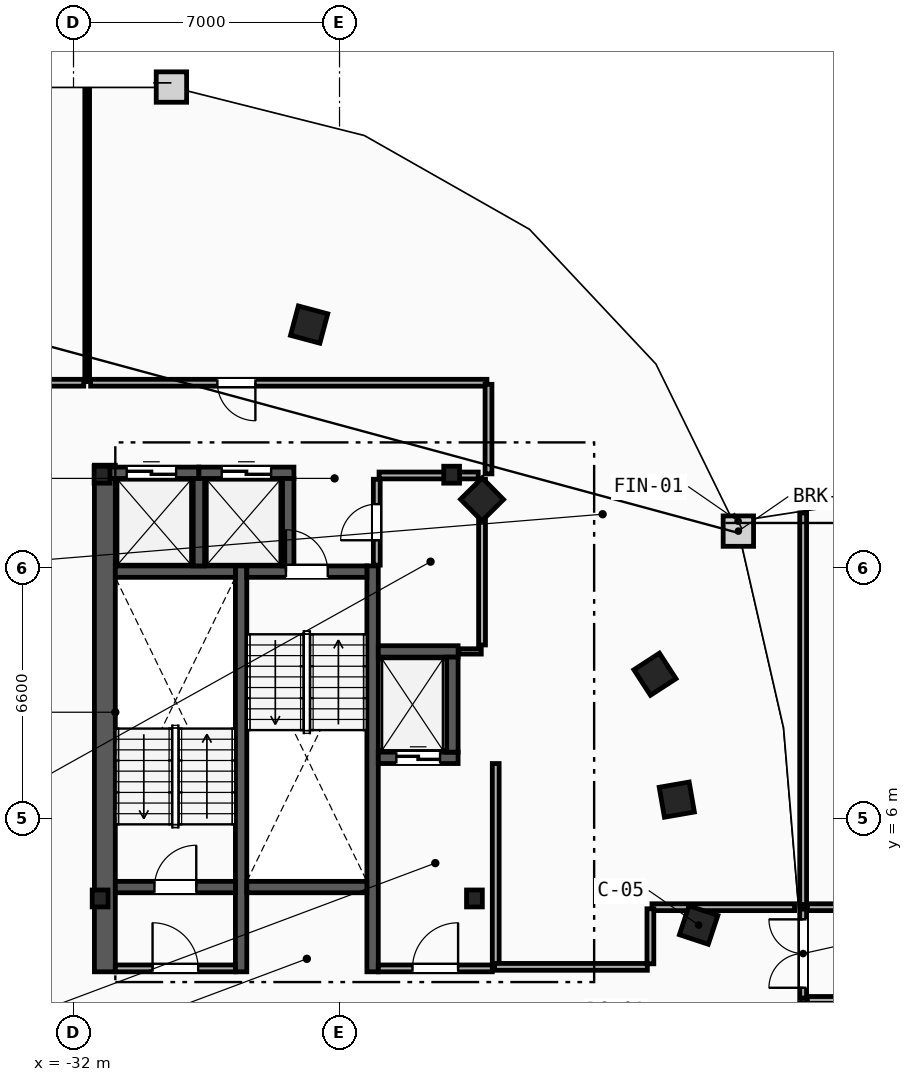
"""IFC4 building model, lengths in metres.
Left out: names, types, materials, properties, quantities, classifications, styles, units other than length and angle.
Written with IfcOpenShell. Run it as: python <this file> out.ifc"""

import sys

from ifc_helpers import new_model, si_unit, direction, frame, frame_2d, origin, origin_2d, place, context, subcontext, project, spatial, rectangle, i_section, extrude, element, fill, save


model = new_model("IFC4")
c1 = context("Model", 3, precision=1e-05, world=origin(), true_north=direction((0.0, 1.0)))
c2 = subcontext(c1, "Body", "Model", "MODEL_VIEW")
j1 = project(units=[si_unit("LENGTHUNIT", "METRE"), si_unit("PLANEANGLEUNIT", "RADIAN")], contexts=[c1])
p1 = place(None, origin())
s1 = spatial("IfcSite", under=j1, at=p1, CompositionType="ELEMENT")
p2 = place(p1, origin())
s2 = spatial("IfcBuilding", under=s1, at=p2, CompositionType="ELEMENT")
p3 = place(p2, frame((0.0, 0.0, 268.4)))
s3 = spatial("IfcBuildingStorey", under=s2, at=p3, CompositionType="ELEMENT", Elevation=268.4)
for number, where, z_axis, x_axis in (
    (1, (-31.3, 3.9, 0.0), (0.0, 0.0, 1.0), (1.0, 0.0, 0.0)),
    (2, (-21.45, 3.9, 0.0), (0.0, 0.0, 1.0), (1.0, 0.0, 0.0)),
    (3, (-22.05, 15.05, 0.0), (0.0, 0.0, 1.0), (1.0, 0.0, 0.0)),
    (4, (-31.25, 15.05, 0.0), (0.0, 0.0, 1.0), (1.0, 0.0, 0.0)),
):
    element("IfcColumn", number, at=place(p3, frame(where, z_axis=z_axis, x_axis=x_axis)), inside=s3, PredefinedType="COLUMN", context=c2, shape_type="SweptSolid", body=[
        extrude(i_section(OverallWidth=0.416, OverallDepth=0.446, WebThickness=0.039, FlangeThickness=0.063, FilletRadius=0.018, at=origin_2d()), origin(), (0.0, 0.0, 1.0), 3.6),
    ])
for number, where, z_axis, x_axis in (
    (5, (-15.55, 3.2, 0.0), (0.0, 0.0, 1.0), (0.315, 0.949, 0.0)),
    (6, (-16.125, 6.5, 0.0), (0.0, 0.0, 1.0), (-0.172, 0.985, 0.0)),
    (7, (-16.7, 9.8, 0.0), (0.0, 0.0, 1.0), (-0.544, 0.839, 0.0)),
    (8, (-21.25, 14.4, 0.0), (0.0, 0.0, 1.0), (-0.703, 0.711, 0.0)),
    (9, (-25.8, 19.0, 0.0), (0.0, 0.0, 1.0), (-0.966, 0.259, 0.0)),
):
    element("IfcColumn", number, at=place(p3, frame(where, z_axis=z_axis, x_axis=x_axis)), inside=s3, PredefinedType="COLUMN", context=c2, shape_type="SweptSolid", body=[
        extrude(rectangle(XDim=0.8, YDim=0.8, at=origin_2d()), origin(), (0.0, 0.0, 1.0), 3.6),
    ])
p4 = place(p3, frame((-31.175, 1.97, 0.0), z_axis=(0.0, 0.0, 1.0), x_axis=(0.0, 1.0, 0.0)))
e10 = element("IfcWall", 10, at=p4, inside=s3, PredefinedType="SHEAR", context=c2, shape_type="SweptSolid", body=[
    extrude(rectangle(XDim=13.33, YDim=0.55, at=frame_2d((6.665, 0.0))), origin(), (0.0, 0.0, 1.0), 3.34),
])
for number, where, z_axis, x_axis in (
    (11, (-27.59, 1.97, 0.0), (0.0, 0.0, 1.0), (0.0, 1.0, 0.0)),
    (12, (-24.13, 1.97, 0.0), (0.0, 0.0, 1.0), (0.0, 1.0, 0.0)),
):
    element("IfcWall", number, at=place(p3, frame(where, z_axis=z_axis, x_axis=x_axis)), inside=s3, PredefinedType="SHEAR", context=c2, shape_type="SweptSolid", body=[
        extrude(rectangle(XDim=10.68, YDim=0.3, at=frame_2d((5.34, 0.0))), origin(), (0.0, 0.0, 1.0), 3.34),
    ])
p5 = place(p3, frame((-30.9, 4.2, 0.0), z_axis=(0.0, 0.0, 1.0), x_axis=(1.0, 0.0, 0.0)))
e13 = element("IfcWall", 13, at=p5, inside=s3, PredefinedType="SHEAR", context=c2, shape_type="SweptSolid", body=[
    extrude(rectangle(XDim=3.16, YDim=0.3, at=frame_2d((1.58, 0.0))), origin(), (0.0, 0.0, 1.0), 3.34),
])
p6 = place(p5, frame((1.03, 0.0, 0.0)))
e14 = element("IfcOpeningElement", 14, at=p6, cuts=e13, PredefinedType="OPENING", context=c2, shape_type="SweptSolid", body=[
    extrude(rectangle(XDim=1.1, YDim=2.15, at=frame_2d((0.55, 1.075))), frame((0.0, 0.16, 0.0), z_axis=(0.0, -1.0, 0.0), x_axis=(1.0, 0.0, 0.0)), (0.0, 0.0, 1.0), 0.32),
])
p7 = place(p3, frame((-30.9, 12.5, 0.0), z_axis=(0.0, 0.0, 1.0), x_axis=(1.0, 0.0, 0.0)))
e15 = element("IfcWall", 15, at=p7, inside=s3, PredefinedType="SHEAR", context=c2, shape_type="SweptSolid", body=[
    extrude(rectangle(XDim=3.16, YDim=0.3, at=frame_2d((1.58, 0.0))), origin(), (0.0, 0.0, 1.0), 3.34),
])
p8 = place(p3, frame((-27.44, 12.5, 0.0), z_axis=(0.0, 0.0, 1.0), x_axis=(1.0, 0.0, 0.0)))
e16 = element("IfcWall", 16, at=p8, inside=s3, PredefinedType="SHEAR", context=c2, shape_type="SweptSolid", body=[
    extrude(rectangle(XDim=3.16, YDim=0.3, at=frame_2d((1.58, 0.0))), origin(), (0.0, 0.0, 1.0), 3.34),
])
p9 = place(p8, frame((1.03, 0.0, 0.0)))
e17 = element("IfcOpeningElement", 17, at=p9, cuts=e16, PredefinedType="OPENING", context=c2, shape_type="SweptSolid", body=[
    extrude(rectangle(XDim=1.1, YDim=2.15, at=frame_2d((0.55, 1.075))), frame((0.0, 0.16, 0.0), z_axis=(0.0, -1.0, 0.0), x_axis=(1.0, 0.0, 0.0)), (0.0, 0.0, 1.0), 0.32),
])
p10 = place(p3, frame((-27.44, 4.2, 0.0), z_axis=(0.0, 0.0, 1.0), x_axis=(1.0, 0.0, 0.0)))
e18 = element("IfcWall", 18, at=p10, inside=s3, PredefinedType="SHEAR", context=c2, shape_type="SweptSolid", body=[
    extrude(rectangle(XDim=3.16, YDim=0.3, at=frame_2d((1.58, 0.0))), origin(), (0.0, 0.0, 1.0), 3.34),
])
p11 = place(p3, frame((-20.89, 2.15, 0.0), z_axis=(0.0, 0.0, 1.0), x_axis=(0.0, 1.0, 0.0)))
e19 = element("IfcWall", 19, at=p11, inside=s3, PredefinedType="PARTITIONING", context=c2, shape_type="SweptSolid", body=[
    extrude(rectangle(XDim=5.3, YDim=0.18, at=frame_2d((2.65, 0.0))), origin(), (0.0, 0.0, 1.0), 3.34),
])
p12 = place(p3, frame((-23.98, 2.06, 0.0), z_axis=(0.0, 0.0, 1.0), x_axis=(1.0, 0.0, 0.0)))
e20 = element("IfcWall", 20, at=p12, inside=s3, PredefinedType="PARTITIONING", context=c2, shape_type="SweptSolid", body=[
    extrude(rectangle(XDim=3.0, YDim=0.18, at=frame_2d((1.5, 0.0))), origin(), (0.0, 0.0, 1.0), 3.34),
])
p13 = place(p12, frame((0.9, 0.0, 0.0)))
e21 = element("IfcOpeningElement", 21, at=p13, cuts=e20, PredefinedType="OPENING", context=c2, shape_type="SweptSolid", body=[
    extrude(rectangle(XDim=1.2, YDim=2.15, at=frame_2d((0.6, 1.075))), frame((0.0, 0.1, 0.0), z_axis=(0.0, -1.0, 0.0), x_axis=(1.0, 0.0, 0.0)), (0.0, 0.0, 1.0), 0.2),
])
p14 = place(p3, frame((-30.9, 2.06, 0.0), z_axis=(0.0, 0.0, 1.0), x_axis=(1.0, 0.0, 0.0)))
e22 = element("IfcWall", 22, at=p14, inside=s3, PredefinedType="PARTITIONING", context=c2, shape_type="SweptSolid", body=[
    extrude(rectangle(XDim=3.16, YDim=0.18, at=frame_2d((1.58, 0.0))), origin(), (0.0, 0.0, 1.0), 3.34),
])
p15 = place(p14, frame((0.98, 0.0, 0.0)))
e23 = element("IfcOpeningElement", 23, at=p15, cuts=e22, PredefinedType="OPENING", context=c2, shape_type="SweptSolid", body=[
    extrude(rectangle(XDim=1.2, YDim=2.15, at=frame_2d((0.6, 1.075))), frame((0.0, 0.1, 0.0), z_axis=(0.0, -1.0, 0.0), x_axis=(1.0, 0.0, 0.0)), (0.0, 0.0, 1.0), 0.2),
])
p16 = place(p3, frame((-23.98, 7.6, 0.0), z_axis=(0.0, 0.0, 1.0), x_axis=(1.0, 0.0, 0.0)))
e24 = element("IfcWall", 24, at=p16, inside=s3, PredefinedType="SHEAR", context=c2, shape_type="SweptSolid", body=[
    extrude(rectangle(XDim=2.1, YDim=0.3, at=frame_2d((1.05, 0.0))), origin(), (0.0, 0.0, 1.0), 3.34),
])
p17 = place(p16, frame((0.475, 0.0, 0.0)))
e25 = element("IfcOpeningElement", 25, at=p17, cuts=e24, PredefinedType="OPENING", context=c2, shape_type="SweptSolid", body=[
    extrude(rectangle(XDim=1.15, YDim=2.2, at=frame_2d((0.575, 1.1))), frame((0.0, 0.16, 0.0), z_axis=(0.0, -1.0, 0.0), x_axis=(1.0, 0.0, 0.0)), (0.0, 0.0, 1.0), 0.32),
])
p18 = place(p3, frame((-23.98, 10.4, 0.0), z_axis=(0.0, 0.0, 1.0), x_axis=(1.0, 0.0, 0.0)))
e26 = element("IfcWall", 26, at=p18, inside=s3, PredefinedType="SHEAR", context=c2, shape_type="SweptSolid", body=[
    extrude(rectangle(XDim=2.1, YDim=0.3, at=frame_2d((1.05, 0.0))), origin(), (0.0, 0.0, 1.0), 3.34),
])
p19 = place(p3, frame((-22.03, 7.75, 0.0), z_axis=(0.0, 0.0, 1.0), x_axis=(0.0, 1.0, 0.0)))
e27 = element("IfcWall", 27, at=p19, inside=s3, PredefinedType="SHEAR", context=c2, shape_type="SweptSolid", body=[
    extrude(rectangle(XDim=2.5, YDim=0.3, at=frame_2d((1.25, 0.0))), origin(), (0.0, 0.0, 1.0), 3.34),
])
p20 = place(p3, frame((-31.2, 15.1, 0.0), z_axis=(0.0, 0.0, 1.0), x_axis=(1.0, 0.0, 0.0)))
e28 = element("IfcWall", 28, at=p20, inside=s3, PredefinedType="SHEAR", context=c2, shape_type="SweptSolid", body=[
    extrude(rectangle(XDim=2.5, YDim=0.3, at=frame_2d((1.25, 0.0))), origin(), (0.0, 0.0, 1.0), 3.34),
])
p21 = place(p20, frame((0.6, 0.0, 0.0)))
e29 = element("IfcOpeningElement", 29, at=p21, cuts=e28, PredefinedType="OPENING", context=c2, shape_type="SweptSolid", body=[
    extrude(rectangle(XDim=1.3, YDim=2.2, at=frame_2d((0.65, 1.1))), frame((0.0, 0.16, 0.0), z_axis=(0.0, -1.0, 0.0), x_axis=(1.0, 0.0, 0.0)), (0.0, 0.0, 1.0), 0.32),
])
p22 = place(p3, frame((-28.7, 12.65, 0.0), z_axis=(0.0, 0.0, 1.0), x_axis=(0.0, 1.0, 0.0)))
e30 = element("IfcWall", 30, at=p22, inside=s3, PredefinedType="SHEAR", context=c2, shape_type="SweptSolid", body=[
    extrude(rectangle(XDim=2.3, YDim=0.3, at=frame_2d((1.15, 0.0))), origin(), (0.0, 0.0, 1.0), 3.34),
])
p23 = place(p3, frame((-28.7, 15.1, 0.0), z_axis=(0.0, 0.0, 1.0), x_axis=(1.0, 0.0, 0.0)))
e31 = element("IfcWall", 31, at=p23, inside=s3, PredefinedType="SHEAR", context=c2, shape_type="SweptSolid", body=[
    extrude(rectangle(XDim=2.5, YDim=0.3, at=frame_2d((1.25, 0.0))), origin(), (0.0, 0.0, 1.0), 3.34),
])
p24 = place(p23, frame((0.6, 0.0, 0.0)))
e32 = element("IfcOpeningElement", 32, at=p24, cuts=e31, PredefinedType="OPENING", context=c2, shape_type="SweptSolid", body=[
    extrude(rectangle(XDim=1.3, YDim=2.2, at=frame_2d((0.65, 1.1))), frame((0.0, 0.16, 0.0), z_axis=(0.0, -1.0, 0.0), x_axis=(1.0, 0.0, 0.0)), (0.0, 0.0, 1.0), 0.32),
])
p25 = place(p3, frame((-26.35, 12.65, 0.0), z_axis=(0.0, 0.0, 1.0), x_axis=(0.0, 1.0, 0.0)))
e33 = element("IfcWall", 33, at=p25, inside=s3, PredefinedType="SHEAR", context=c2, shape_type="SweptSolid", body=[
    extrude(rectangle(XDim=2.3, YDim=0.3, at=frame_2d((1.15, 0.0))), origin(), (0.0, 0.0, 1.0), 3.34),
])
p26 = place(p3, frame((-21.86, 10.4, 0.0), z_axis=(0.0, 0.0, 1.0), x_axis=(1.0, 0.0, 0.0)))
e34 = element("IfcWall", 34, at=p26, inside=s3, PredefinedType="PARTITIONING", context=c2, shape_type="SweptSolid", body=[
    extrude(rectangle(XDim=0.59, YDim=0.14, at=frame_2d((0.295, 0.0))), origin(), (0.0, 0.0, 1.0), 3.34),
])
p27 = place(p3, frame((-21.25, 10.57, 0.0), z_axis=(0.0, 0.0, 1.0), x_axis=(0.0, 1.0, 0.0)))
e35 = element("IfcWall", 35, at=p27, inside=s3, PredefinedType="PARTITIONING", context=c2, shape_type="SweptSolid", body=[
    extrude(rectangle(XDim=4.36, YDim=0.18, at=frame_2d((2.18, 0.0))), origin(), (0.0, 0.0, 1.0), 3.34),
])
p28 = place(p3, frame((-23.96, 15.03, 0.0), z_axis=(0.0, 0.0, 1.0), x_axis=(1.0, 0.0, 0.0)))
e36 = element("IfcWall", 36, at=p28, inside=s3, PredefinedType="PARTITIONING", context=c2, shape_type="SweptSolid", body=[
    extrude(rectangle(XDim=2.61, YDim=0.18, at=frame_2d((1.305, 0.0))), origin(), (0.0, 0.0, 1.0), 2.413),
])
p29 = place(p3, frame((-24.02, 12.67, 0.0), z_axis=(0.0, 0.0, 1.0), x_axis=(0.0, 1.0, 0.0)))
e37 = element("IfcWall", 37, at=p29, inside=s3, PredefinedType="PARTITIONING", context=c2, shape_type="SweptSolid", body=[
    extrude(rectangle(XDim=2.26, YDim=0.18, at=frame_2d((1.13, 0.0))), origin(), (0.0, 0.0, 1.0), 3.34),
])
p30 = place(p29, frame((0.655, 0.0, 0.0)))
e38 = element("IfcOpeningElement", 38, at=p30, cuts=e37, PredefinedType="OPENING", context=c2, shape_type="SweptSolid", body=[
    extrude(rectangle(XDim=0.95, YDim=2.1, at=frame_2d((0.475, 1.05))), frame((0.0, 0.1, 0.0), z_axis=(0.0, -1.0, 0.0), x_axis=(1.0, 0.0, 0.0)), (0.0, 0.0, 1.0), 0.2),
])
p31 = place(p3, frame((-31.64, 17.5, 0.0), z_axis=(0.0, 0.0, 1.0), x_axis=(0.0, 1.0, 0.0)))
e39 = element("IfcWall", 39, at=p31, inside=s3, PredefinedType="PARTITIONING", context=c2, shape_type="SweptSolid", body=[
    extrude(rectangle(XDim=7.69, YDim=0.125, at=frame_2d((3.845, 0.0))), origin(), (0.0, 0.0, 1.0), 3.34),
])
p32 = place(p3, frame((-31.73, 17.47, 0.0), z_axis=(0.0, 0.0, 1.0), x_axis=(-1.0, 0.0, 0.0)))
e40 = element("IfcWall", 40, at=p32, inside=s3, PredefinedType="PARTITIONING", context=c2, shape_type="SweptSolid", body=[
    extrude(rectangle(XDim=1.898, YDim=0.18, at=frame_2d((0.949, 0.0))), origin(), (0.0, 0.0, 1.0), 3.34),
])
p33 = place(p3, frame((-21.122, 17.47, 0.0), z_axis=(0.0, 0.0, 1.0), x_axis=(-1.0, 0.0, 0.0)))
e41 = element("IfcWall", 41, at=p33, inside=s3, PredefinedType="PARTITIONING", context=c2, shape_type="SweptSolid", body=[
    extrude(rectangle(XDim=10.428, YDim=0.18, at=frame_2d((5.214, 0.0))), origin(), (0.0, 0.0, 1.0), 3.34),
])
p34 = place(p33, frame((6.093, 0.0, 0.0)))
e42 = element("IfcOpeningElement", 42, at=p34, cuts=e41, PredefinedType="OPENING", context=c2, shape_type="SweptSolid", body=[
    extrude(rectangle(XDim=1.0, YDim=2.15, at=frame_2d((0.5, 1.075))), frame((0.0, 0.1, 0.0), z_axis=(0.0, -1.0, 0.0), x_axis=(1.0, 0.0, 0.0)), (0.0, 0.0, 1.0), 0.2),
])
p35 = place(p3, frame((-16.9, 2.1, 0.0), z_axis=(0.0, 0.0, 1.0), x_axis=(-1.0, 0.0, 0.0)))
e43 = element("IfcWall", 43, at=p35, inside=s3, PredefinedType="PARTITIONING", context=c2, shape_type="SweptSolid", body=[
    extrude(rectangle(XDim=4.02, YDim=0.18, at=frame_2d((2.01, 0.0))), origin(), (0.0, 0.0, 1.0), 3.34),
])
p36 = place(p3, frame((-13.026, 3.67, 0.0), z_axis=(0.0, 0.0, 1.0), x_axis=(-1.0, 0.0, 0.0)))
e44 = element("IfcWall", 44, at=p36, inside=s3, PredefinedType="PARTITIONING", context=c2, shape_type="SweptSolid", body=[
    extrude(rectangle(XDim=3.753, YDim=0.18, at=frame_2d((1.876, 0.0))), origin(), (0.0, 0.0, 1.0), 3.34),
])
p37 = place(p3, frame((-21.08, 15.072, 0.0), z_axis=(0.0, 0.0, 1.0), x_axis=(0.0, 1.0, 0.0)))
e45 = element("IfcWall", 45, at=p37, inside=s3, PredefinedType="PARTITIONING", context=c2, shape_type="SweptSolid", body=[
    extrude(rectangle(XDim=2.357, YDim=0.18, at=frame_2d((1.178, 0.0))), origin(), (0.0, 0.0, 1.0), 3.34),
])
p38 = place(p3, frame((-16.82, 3.628, 0.0), z_axis=(0.0, 0.0, 1.0), x_axis=(0.0, -1.0, 0.0)))
e46 = element("IfcWall", 46, at=p38, inside=s3, PredefinedType="PARTITIONING", context=c2, shape_type="SweptSolid", body=[
    extrude(rectangle(XDim=1.448, YDim=0.18, at=frame_2d((0.724, 0.0))), origin(), (0.0, 0.0, 1.0), 3.34),
])
p39 = place(p3, frame((-12.688, 1.23, 0.0), z_axis=(0.0, 0.0, 1.0), x_axis=(1.0, 0.0, 0.0)))
e47 = element("IfcWall", 47, at=p39, inside=s3, PredefinedType="PARTITIONING", context=c2, shape_type="SweptSolid", body=[
    extrude(rectangle(XDim=15.193, YDim=0.18, at=frame_2d((7.597, 0.0))), origin(), (0.0, 0.0, 1.0), 2.663),
])
p40 = place(p39, frame((6.797, 0.0, 0.0)))
e48 = element("IfcOpeningElement", 48, at=p40, cuts=e47, PredefinedType="OPENING", context=c2, shape_type="SweptSolid", body=[
    extrude(rectangle(XDim=1.6, YDim=2.2, at=frame_2d((0.8, 1.1))), frame((0.0, 0.1, 0.0), z_axis=(0.0, -1.0, 0.0), x_axis=(1.0, 0.0, 0.0)), (0.0, 0.0, 1.0), 0.2),
])
p41 = place(p3, frame((2.505, 3.67, 0.0), z_axis=(0.0, 0.0, 1.0), x_axis=(-1.0, 0.0, 0.0)))
e49 = element("IfcWall", 49, at=p41, inside=s3, PredefinedType="PARTITIONING", context=c2, shape_type="SweptSolid", body=[
    extrude(rectangle(XDim=15.193, YDim=0.18, at=frame_2d((7.597, 0.0))), origin(), (0.0, 0.0, 1.0), 3.34),
])
p42 = place(p41, frame((6.797, 0.0, 0.0)))
e50 = element("IfcOpeningElement", 50, at=p42, cuts=e49, PredefinedType="OPENING", context=c2, shape_type="SweptSolid", body=[
    extrude(rectangle(XDim=1.6, YDim=2.2, at=frame_2d((0.8, 1.1))), frame((0.0, 0.1, 0.0), z_axis=(0.0, -1.0, 0.0), x_axis=(1.0, 0.0, 0.0)), (0.0, 0.0, 1.0), 0.2),
])
p43 = place(p3, frame((-12.8, 3.74, 0.0), z_axis=(0.0, 0.0, 1.0), x_axis=(0.0, 1.0, 0.0)))
e51 = element("IfcWall", 51, at=p43, inside=s3, PredefinedType="PARTITIONING", context=c2, shape_type="SweptSolid", body=[
    extrude(rectangle(XDim=10.304, YDim=0.18, at=frame_2d((5.152, 0.0))), origin(), (0.0, 0.0, 1.0), 3.34),
])
p44 = place(p3, frame((-12.8, 1.28, 0.0), z_axis=(0.0, 0.0, 1.0), x_axis=(0.0, 1.0, 0.0)))
e52 = element("IfcWall", 52, at=p44, inside=s3, PredefinedType="PARTITIONING", context=c2, shape_type="SweptSolid", body=[
    extrude(rectangle(XDim=2.34, YDim=0.18, at=frame_2d((1.17, 0.0))), origin(), (0.0, 0.0, 1.0), 3.34),
])
p45 = place(p44, frame((0.27, 0.0, 0.0)))
e53 = element("IfcOpeningElement", 53, at=p45, cuts=e52, PredefinedType="OPENING", context=c2, shape_type="SweptSolid", body=[
    extrude(rectangle(XDim=1.8, YDim=2.25, at=frame_2d((0.9, 1.125))), frame((0.0, 0.1, 0.0), z_axis=(0.0, -1.0, 0.0), x_axis=(1.0, 0.0, 0.0)), (0.0, 0.0, 1.0), 0.2),
])
p46 = place(p6, origin())
e54 = element("IfcDoor", 54, at=p46, inside=s3, OperationType="SINGLE_SWING_RIGHT", PredefinedType="DOOR", context=c2, shape_type="SweptSolid", body=[
    extrude(rectangle(XDim=1.1, YDim=2.15, at=frame_2d((0.55, 1.075))), frame((0.0, 0.025, 0.0), z_axis=(0.0, -1.0, 0.0), x_axis=(1.0, 0.0, 0.0)), (0.0, 0.0, 1.0), 0.05),
])
fill(e14, e54)
p47 = place(p9, origin())
e55 = element("IfcDoor", 55, at=p47, inside=s3, OperationType="SINGLE_SWING_LEFT", PredefinedType="DOOR", context=c2, shape_type="SweptSolid", body=[
    extrude(rectangle(XDim=1.1, YDim=2.15, at=frame_2d((0.55, 1.075))), frame((0.0, 0.025, 0.0), z_axis=(0.0, -1.0, 0.0), x_axis=(1.0, 0.0, 0.0)), (0.0, 0.0, 1.0), 0.05),
])
fill(e17, e55)
p48 = place(p13, origin())
e56 = element("IfcDoor", 56, at=p48, inside=s3, OperationType="SINGLE_SWING_RIGHT", PredefinedType="DOOR", context=c2, shape_type="SweptSolid", body=[
    extrude(rectangle(XDim=1.2, YDim=2.15, at=frame_2d((0.6, 1.075))), frame((0.0, 0.025, 0.0), z_axis=(0.0, -1.0, 0.0), x_axis=(1.0, 0.0, 0.0)), (0.0, 0.0, 1.0), 0.05),
])
fill(e21, e56)
p49 = place(p15, origin())
e57 = element("IfcDoor", 57, at=p49, inside=s3, OperationType="SINGLE_SWING_LEFT", PredefinedType="DOOR", context=c2, shape_type="SweptSolid", body=[
    extrude(rectangle(XDim=1.2, YDim=2.15, at=frame_2d((0.6, 1.075))), frame((0.0, 0.025, 0.0), z_axis=(0.0, -1.0, 0.0), x_axis=(1.0, 0.0, 0.0)), (0.0, 0.0, 1.0), 0.05),
])
fill(e23, e57)
p50 = place(p17, origin())
e58 = element("IfcDoor", 58, at=p50, inside=s3, OperationType="SLIDING_TO_LEFT", PredefinedType="TRAPDOOR", context=c2, shape_type="SweptSolid", body=[
    extrude(rectangle(XDim=1.15, YDim=2.2, at=frame_2d((0.575, 1.1))), frame((0.0, 0.025, 0.0), z_axis=(0.0, -1.0, 0.0), x_axis=(1.0, 0.0, 0.0)), (0.0, 0.0, 1.0), 0.05),
])
fill(e25, e58)
p51 = place(p21, origin())
e59 = element("IfcDoor", 59, at=p51, inside=s3, OperationType="SLIDING_TO_LEFT", PredefinedType="TRAPDOOR", context=c2, shape_type="SweptSolid", body=[
    extrude(rectangle(XDim=1.3, YDim=2.2, at=frame_2d((0.65, 1.1))), frame((0.0, 0.025, 0.0), z_axis=(0.0, -1.0, 0.0), x_axis=(1.0, 0.0, 0.0)), (0.0, 0.0, 1.0), 0.05),
])
fill(e29, e59)
p52 = place(p24, origin())
e60 = element("IfcDoor", 60, at=p52, inside=s3, OperationType="SLIDING_TO_LEFT", PredefinedType="TRAPDOOR", context=c2, shape_type="SweptSolid", body=[
    extrude(rectangle(XDim=1.3, YDim=2.2, at=frame_2d((0.65, 1.1))), frame((0.0, 0.025, 0.0), z_axis=(0.0, -1.0, 0.0), x_axis=(1.0, 0.0, 0.0)), (0.0, 0.0, 1.0), 0.05),
])
fill(e32, e60)
p53 = place(p34, origin())
e61 = element("IfcDoor", 61, at=p53, inside=s3, OperationType="SINGLE_SWING_LEFT", PredefinedType="DOOR", context=c2, shape_type="SweptSolid", body=[
    extrude(rectangle(XDim=1.0, YDim=2.15, at=frame_2d((0.5, 1.075))), frame((0.0, 0.025, 0.0), z_axis=(0.0, -1.0, 0.0), x_axis=(1.0, 0.0, 0.0)), (0.0, 0.0, 1.0), 0.05),
])
fill(e42, e61)
p54 = place(p45, origin())
e62 = element("IfcDoor", 62, at=p54, inside=s3, OperationType="DOUBLE_DOOR_SINGLE_SWING", PredefinedType="DOOR", context=c2, shape_type="SweptSolid", body=[
    extrude(rectangle(XDim=1.8, YDim=2.25, at=frame_2d((0.9, 1.125))), frame((0.0, 0.025, 0.0), z_axis=(0.0, -1.0, 0.0), x_axis=(1.0, 0.0, 0.0)), (0.0, 0.0, 1.0), 0.05),
])
fill(e53, e62)
p55 = place(p30, origin())
e63 = element("IfcDoor", 63, at=p55, inside=s3, OperationType="SINGLE_SWING_LEFT", PredefinedType="DOOR", context=c2, shape_type="SweptSolid", body=[
    extrude(rectangle(XDim=0.95, YDim=2.1, at=frame_2d((0.475, 1.05))), frame((0.0, 0.025, 0.0), z_axis=(0.0, -1.0, 0.0), x_axis=(1.0, 0.0, 0.0)), (0.0, 0.0, 1.0), 0.05),
])
fill(e38, e63)
save(model, sys.argv[1])
